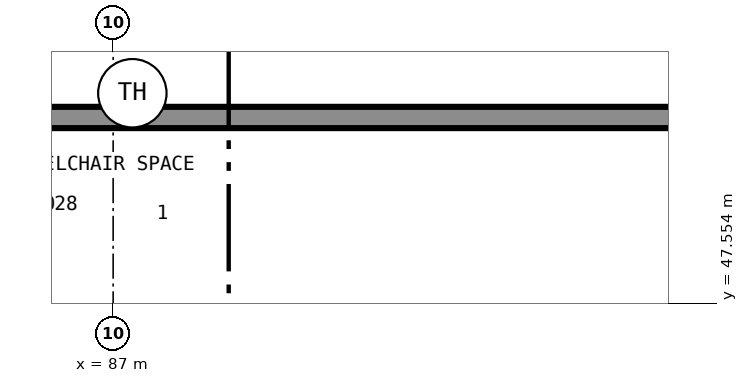
"""IFC4 building model, lengths in metres.
Left out: names, types, materials, properties, quantities, classifications, styles, units other than length and angle.
Written with IfcOpenShell. Run it as: python <this file> out.ifc"""

import sys

from ifc_helpers import new_model, si_unit, direction, frame, frame_2d, origin, place, context, subcontext, project, spatial, rectangle, extrude, element, save


model = new_model("IFC4")
c1 = context("Model", 3, precision=1e-05, world=origin(), true_north=direction((0.0, 1.0)))
c2 = subcontext(c1, "Body", "Model", "MODEL_VIEW")
j1 = project(units=[si_unit("LENGTHUNIT", "METRE"), si_unit("PLANEANGLEUNIT", "RADIAN")], contexts=[c1])
p1 = place(None, origin())
s1 = spatial("IfcSite", under=j1, at=p1, CompositionType="ELEMENT")
p2 = place(p1, origin())
s2 = spatial("IfcBuilding", under=s1, at=p2, CompositionType="ELEMENT")
p3 = place(p2, frame((0.0, 0.0, 13.5)))
s3 = spatial("IfcBuildingStorey", under=s2, at=p3, CompositionType="ELEMENT", Elevation=13.5)
p4 = place(p3, frame((106.14, 50.0, 0.0), z_axis=(0.0, 0.0, 1.0), x_axis=(-1.0, 0.0, 0.0)))
e1 = element("IfcWall", 1, at=p4, inside=s3, PredefinedType="SOLIDWALL", context=c2, shape_type="SweptSolid", body=[
    extrude(rectangle(XDim=20.28, YDim=0.28, at=frame_2d((10.14, 0.0))), origin(), (0.0, 0.0, 1.0), 4.0),
])
save(model, sys.argv[1])
